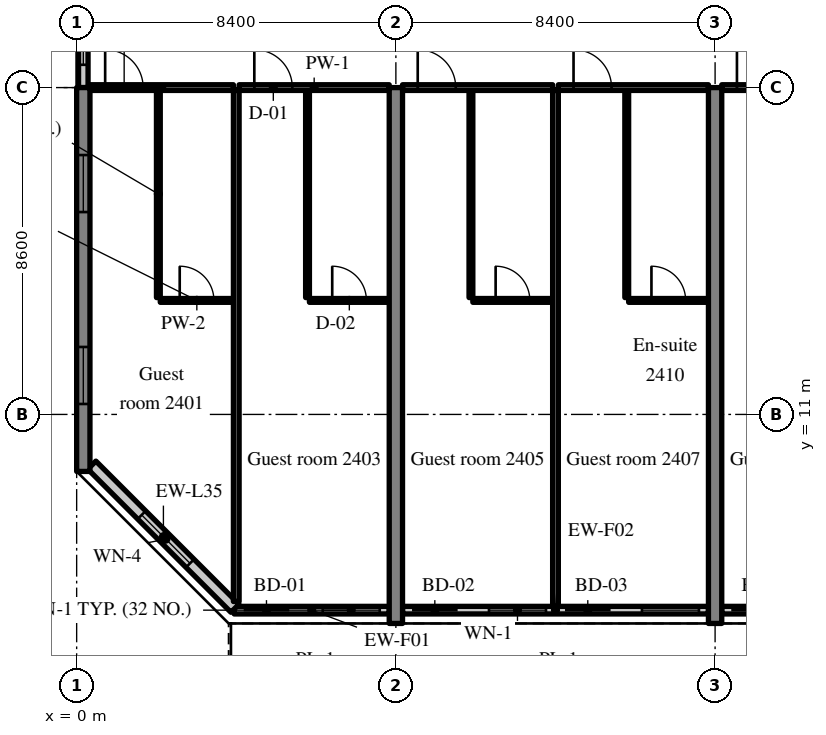
"""IFC4 building model, lengths in metres.
Left out: names, types, materials, properties, quantities, classifications, styles, units other than length and angle.
Written with IfcOpenShell. Run it as: python <this file> out.ifc"""

import sys

from ifc_helpers import new_model, si_unit, direction, frame, frame_2d, origin, place, context, subcontext, project, spatial, rectangle, extrude, source, transform, mapped, element, fill, save


model = new_model("IFC4")
c1 = context("Model", 3, precision=1e-05, world=origin(), true_north=direction((0.0, 1.0)))
c2 = subcontext(c1, "Body", "Model", "MODEL_VIEW")
j1 = project(units=[si_unit("LENGTHUNIT", "METRE"), si_unit("PLANEANGLEUNIT", "RADIAN")], contexts=[c1])
p1 = place(None, origin())
s1 = spatial("IfcSite", under=j1, at=p1, CompositionType="ELEMENT")
p2 = place(p1, origin())
s2 = spatial("IfcBuilding", under=s1, at=p2, CompositionType="ELEMENT")
p3 = place(p2, frame((0.0, 0.0, 102.8)))
s3 = spatial("IfcBuildingStorey", under=s2, at=p3, CompositionType="ELEMENT", Elevation=102.8)
m1 = source(origin(), c2, "Body", "SweptSolid", [
    extrude(rectangle(XDim=10.1, YDim=0.35, at=frame_2d((5.05, 0.0))), origin(), (0.0, 0.0, 1.0), 3.52),
])
p4 = place(p3, frame((0.175, 9.5, 0.0), z_axis=(0.0, 0.0, 1.0), x_axis=(0.0, 1.0, 0.0)))
e1 = element("IfcWall", 1, at=p4, inside=s3, PredefinedType="SHEAR", context=c2, shape_type="MappedRepresentation", body=[
    mapped(m1, transform((0.0, 0.0, 0.0), scale=1.0)),
])
m2 = source(origin(), c2, "Body", "SweptSolid", [
    extrude(rectangle(XDim=1.5, YDim=1.5, at=frame_2d((0.75, 0.75))), frame((0.0, 0.185, 0.0), z_axis=(0.0, -1.0, 0.0), x_axis=(1.0, 0.0, 0.0)), (0.0, 0.0, 1.0), 0.37),
])
p5 = place(p4, frame((1.775, 0.0, 0.9)))
e2 = element("IfcOpeningElement", 2, at=p5, cuts=e1, PredefinedType="OPENING", context=c2, shape_type="MappedRepresentation", body=[
    mapped(m2, transform((0.0, 0.0, 0.0), scale=1.0)),
])
p6 = place(p4, frame((6.825, 0.0, 0.9)))
e3 = element("IfcOpeningElement", 3, at=p6, cuts=e1, PredefinedType="OPENING", context=c2, shape_type="MappedRepresentation", body=[
    mapped(m2, transform((0.0, 0.0, 0.0), scale=1.0)),
])
m3 = source(origin(), c2, "Body", "SweptSolid", [
    extrude(rectangle(XDim=14.1, YDim=0.35, at=frame_2d((7.05, 0.0))), origin(), (0.0, 0.0, 1.0), 3.52),
])
for number, where, z_axis, x_axis in (
    (4, (8.4, 5.5, 0.0), (0.0, 0.0, 1.0), (0.0, 1.0, 0.0)),
    (5, (16.8, 5.5, 0.0), (0.0, 0.0, 1.0), (0.0, 1.0, 0.0)),
):
    element("IfcWall", number, at=place(p3, frame(where, z_axis=z_axis, x_axis=x_axis)), inside=s3, PredefinedType="SHEAR", context=c2, shape_type="MappedRepresentation", body=[
        mapped(m3, transform((0.0, 0.0, 0.0), scale=1.0)),
    ])
m4 = source(origin(), c2, "Body", "SweptSolid", [
    extrude(rectangle(XDim=4.08, YDim=0.2, at=frame_2d((2.04, 0.0))), origin(), (0.0, 0.0, 1.0), 2.82),
])
p7 = place(p3, frame((4.145, 5.85, 0.0), z_axis=(0.0, 0.0, 1.0), x_axis=(1.0, 0.0, 0.0)))
e6 = element("IfcWall", 6, at=p7, inside=s3, PredefinedType="SOLIDWALL", context=c2, shape_type="MappedRepresentation", body=[
    mapped(m4, transform((0.0, 0.0, 0.0), scale=1.0)),
])
m5 = source(origin(), c2, "Body", "SweptSolid", [
    extrude(rectangle(XDim=1.2, YDim=2.4, at=frame_2d((0.6, 1.2))), frame((0.0, 0.11, 0.0), z_axis=(0.0, -1.0, 0.0), x_axis=(1.0, 0.0, 0.0)), (0.0, 0.0, 1.0), 0.22),
])
p8 = place(p7, frame((0.25, 0.0, 0.0)))
e7 = element("IfcOpeningElement", 7, at=p8, cuts=e6, PredefinedType="OPENING", context=c2, shape_type="MappedRepresentation", body=[
    mapped(m5, transform((0.0, 0.0, 0.0), scale=1.0)),
])
m6 = source(origin(), c2, "Body", "SweptSolid", [
    extrude(rectangle(XDim=1.5, YDim=1.5, at=frame_2d((0.75, 0.75))), frame((0.0, 0.11, 0.0), z_axis=(0.0, -1.0, 0.0), x_axis=(1.0, 0.0, 0.0)), (0.0, 0.0, 1.0), 0.22),
])
p9 = place(p7, frame((2.33, 0.0, 0.9)))
e8 = element("IfcOpeningElement", 8, at=p9, cuts=e6, PredefinedType="OPENING", context=c2, shape_type="MappedRepresentation", body=[
    mapped(m6, transform((0.0, 0.0, 0.0), scale=1.0)),
])
m7 = source(origin(), c2, "Body", "SweptSolid", [
    extrude(rectangle(XDim=8.05, YDim=0.2, at=frame_2d((4.025, 0.0))), origin(), (0.0, 0.0, 1.0), 2.82),
])
p10 = place(p3, frame((8.575, 5.85, 0.0), z_axis=(0.0, 0.0, 1.0), x_axis=(1.0, 0.0, 0.0)))
e9 = element("IfcWall", 9, at=p10, inside=s3, PredefinedType="SOLIDWALL", context=c2, shape_type="MappedRepresentation", body=[
    mapped(m7, transform((0.0, 0.0, 0.0), scale=1.0)),
])
p11 = place(p10, frame((0.25, 0.0, 0.0)))
e10 = element("IfcOpeningElement", 10, at=p11, cuts=e9, PredefinedType="OPENING", context=c2, shape_type="MappedRepresentation", body=[
    mapped(m5, transform((0.0, 0.0, 0.0), scale=1.0)),
])
p12 = place(p10, frame((2.275, 0.0, 0.9)))
e11 = element("IfcOpeningElement", 11, at=p12, cuts=e9, PredefinedType="OPENING", context=c2, shape_type="MappedRepresentation", body=[
    mapped(m6, transform((0.0, 0.0, 0.0), scale=1.0)),
])
p13 = place(p10, frame((4.275, 0.0, 0.0)))
e12 = element("IfcOpeningElement", 12, at=p13, cuts=e9, PredefinedType="OPENING", context=c2, shape_type="MappedRepresentation", body=[
    mapped(m5, transform((0.0, 0.0, 0.0), scale=1.0)),
])
p14 = place(p10, frame((6.3, 0.0, 0.9)))
e13 = element("IfcOpeningElement", 13, at=p14, cuts=e9, PredefinedType="OPENING", context=c2, shape_type="MappedRepresentation", body=[
    mapped(m6, transform((0.0, 0.0, 0.0), scale=1.0)),
])
m8 = source(origin(), c2, "Body", "SweptSolid", [
    extrude(rectangle(XDim=8.05, YDim=0.2, at=frame_2d((4.025, 0.0))), origin(), (0.0, 0.0, 1.0), 2.82),
])
p15 = place(p3, frame((16.975, 5.85, 0.0), z_axis=(0.0, 0.0, 1.0), x_axis=(1.0, 0.0, 0.0)))
e14 = element("IfcWall", 14, at=p15, inside=s3, PredefinedType="SOLIDWALL", context=c2, shape_type="MappedRepresentation", body=[
    mapped(m8, transform((0.0, 0.0, 0.0), scale=1.0)),
])
p16 = place(p15, frame((0.25, 0.0, 0.0)))
e15 = element("IfcOpeningElement", 15, at=p16, cuts=e14, PredefinedType="OPENING", context=c2, shape_type="MappedRepresentation", body=[
    mapped(m5, transform((0.0, 0.0, 0.0), scale=1.0)),
])
p17 = place(p15, frame((2.275, 0.0, 0.9)))
e16 = element("IfcOpeningElement", 16, at=p17, cuts=e14, PredefinedType="OPENING", context=c2, shape_type="MappedRepresentation", body=[
    mapped(m6, transform((0.0, 0.0, 0.0), scale=1.0)),
])
p18 = place(p15, frame((4.275, 0.0, 0.0)))
e17 = element("IfcOpeningElement", 17, at=p18, cuts=e14, PredefinedType="OPENING", context=c2, shape_type="MappedRepresentation", body=[
    mapped(m5, transform((0.0, 0.0, 0.0), scale=1.0)),
])
p19 = place(p15, frame((6.3, 0.0, 0.9)))
e18 = element("IfcOpeningElement", 18, at=p19, cuts=e14, PredefinedType="OPENING", context=c2, shape_type="MappedRepresentation", body=[
    mapped(m6, transform((0.0, 0.0, 0.0), scale=1.0)),
])
m9 = source(origin(), c2, "Body", "SweptSolid", [
    extrude(rectangle(XDim=5.326, YDim=0.3, at=frame_2d((2.663, 0.0))), origin(), (0.0, 0.0, 1.0), 3.52),
])
p20 = place(p3, frame((0.4, 9.666, 0.0), z_axis=(0.0, 0.0, 1.0), x_axis=(0.707106781187, -0.707106781187, 0.0)))
e19 = element("IfcWall", 19, at=p20, inside=s3, PredefinedType="SOLIDWALL", context=c2, shape_type="MappedRepresentation", body=[
    mapped(m9, transform((0.0, 0.0, 0.0), scale=1.0)),
])
m10 = source(origin(), c2, "Body", "SweptSolid", [
    extrude(rectangle(XDim=1.8, YDim=1.5, at=frame_2d((0.9, 0.75))), frame((0.0, 0.16, 0.0), z_axis=(0.0, -1.0, 0.0), x_axis=(1.0, 0.0, 0.0)), (0.0, 0.0, 1.0), 0.32),
])
p21 = place(p20, frame((1.854, 0.0, 0.9)))
e20 = element("IfcOpeningElement", 20, at=p21, cuts=e19, PredefinedType="OPENING", context=c2, shape_type="MappedRepresentation", body=[
    mapped(m10, transform((0.0, 0.0, 0.0), scale=1.0)),
])
m11 = source(origin(), c2, "Body", "SweptSolid", [
    extrude(rectangle(XDim=2.4, YDim=0.25, at=frame_2d((1.2, 0.0))), origin(), (0.0, 0.0, 1.0), 2.62),
])
p22 = place(p3, frame((0.175, 19.6, 0.0), z_axis=(0.0, 0.0, 1.0), x_axis=(0.0, 1.0, 0.0)))
e21 = element("IfcWall", 21, at=p22, inside=s3, PredefinedType="SOLIDWALL", context=c2, shape_type="MappedRepresentation", body=[
    mapped(m11, transform((0.0, 0.0, 0.0), scale=1.0)),
])
m12 = source(origin(), c2, "Body", "SweptSolid", [
    extrude(rectangle(XDim=1.2, YDim=1.5, at=frame_2d((0.6, 0.75))), frame((0.0, 0.135, 0.0), z_axis=(0.0, -1.0, 0.0), x_axis=(1.0, 0.0, 0.0)), (0.0, 0.0, 1.0), 0.27),
])
p23 = place(p22, frame((0.6, 0.0, 0.9)))
e22 = element("IfcOpeningElement", 22, at=p23, cuts=e21, PredefinedType="OPENING", context=c2, shape_type="MappedRepresentation", body=[
    mapped(m12, transform((0.0, 0.0, 0.0), scale=1.0)),
])
m13 = source(origin(), c2, "Body", "SweptSolid", [
    extrude(rectangle(XDim=5.45, YDim=0.1, at=frame_2d((2.725, 0.0))), origin(), (0.0, 0.0, 1.0), 3.52),
])
p24 = place(p3, frame((2.15, 14.075, 0.0), z_axis=(0.0, 0.0, 1.0), x_axis=(0.0, 1.0, 0.0)))
e23 = element("IfcWall", 23, at=p24, inside=s3, PredefinedType="PARTITIONING", context=c2, shape_type="MappedRepresentation", body=[
    mapped(m13, transform((0.0, 0.0, 0.0), scale=1.0)),
])
m14 = source(origin(), c2, "Body", "SweptSolid", [
    extrude(rectangle(XDim=1.925, YDim=0.1, at=frame_2d((0.962, 0.0))), origin(), (0.0, 0.0, 1.0), 3.52),
])
p25 = place(p3, frame((2.2, 14.0, 0.0), z_axis=(0.0, 0.0, 1.0), x_axis=(1.0, 0.0, 0.0)))
e24 = element("IfcWall", 24, at=p25, inside=s3, PredefinedType="PARTITIONING", context=c2, shape_type="MappedRepresentation", body=[
    mapped(m14, transform((0.0, 0.0, 0.0), scale=1.0)),
])
m15 = source(origin(), c2, "Body", "SweptSolid", [
    extrude(rectangle(XDim=0.9, YDim=2.1, at=frame_2d((0.45, 1.05))), frame((0.0, 0.06, 0.0), z_axis=(0.0, -1.0, 0.0), x_axis=(1.0, 0.0, 0.0)), (0.0, 0.0, 1.0), 0.12),
])
p26 = place(p25, frame((0.512, 0.0, 0.0)))
e25 = element("IfcOpeningElement", 25, at=p26, cuts=e24, PredefinedType="OPENING", context=c2, shape_type="MappedRepresentation", body=[
    mapped(m15, transform((0.0, 0.0, 0.0), scale=1.0)),
])
m16 = source(origin(), c2, "Body", "SweptSolid", [
    extrude(rectangle(XDim=3.775, YDim=0.15, at=frame_2d((1.887, 0.0))), origin(), (0.0, 0.0, 1.0), 2.82),
])
p27 = place(p3, frame((0.35, 19.6, 0.0), z_axis=(0.0, 0.0, 1.0), x_axis=(1.0, 0.0, 0.0)))
e26 = element("IfcWall", 26, at=p27, inside=s3, PredefinedType="PARTITIONING", context=c2, shape_type="MappedRepresentation", body=[
    mapped(m16, transform((0.0, 0.0, 0.0), scale=1.0)),
])
m17 = source(origin(), c2, "Body", "SweptSolid", [
    extrude(rectangle(XDim=1.0, YDim=2.1, at=frame_2d((0.5, 1.05))), frame((0.0, 0.085, 0.0), z_axis=(0.0, -1.0, 0.0), x_axis=(1.0, 0.0, 0.0)), (0.0, 0.0, 1.0), 0.17),
])
p28 = place(p27, frame((0.4, 0.0, 0.0)))
e27 = element("IfcOpeningElement", 27, at=p28, cuts=e26, PredefinedType="OPENING", context=c2, shape_type="MappedRepresentation", body=[
    mapped(m17, transform((0.0, 0.0, 0.0), scale=1.0)),
])
p29 = place(p3, frame((6.075, 14.075, 0.0), z_axis=(0.0, 0.0, 1.0), x_axis=(0.0, 1.0, 0.0)))
e28 = element("IfcWall", 28, at=p29, inside=s3, PredefinedType="PARTITIONING", context=c2, shape_type="MappedRepresentation", body=[
    mapped(m13, transform((0.0, 0.0, 0.0), scale=1.0)),
])
m18 = source(origin(), c2, "Body", "SweptSolid", [
    extrude(rectangle(XDim=2.1, YDim=0.1, at=frame_2d((1.05, 0.0))), origin(), (0.0, 0.0, 1.0), 3.52),
])
p30 = place(p3, frame((6.125, 14.0, 0.0), z_axis=(0.0, 0.0, 1.0), x_axis=(1.0, 0.0, 0.0)))
e29 = element("IfcWall", 29, at=p30, inside=s3, PredefinedType="PARTITIONING", context=c2, shape_type="MappedRepresentation", body=[
    mapped(m18, transform((0.0, 0.0, 0.0), scale=1.0)),
])
p31 = place(p30, frame((0.6, 0.0, 0.0)))
e30 = element("IfcOpeningElement", 30, at=p31, cuts=e29, PredefinedType="OPENING", context=c2, shape_type="MappedRepresentation", body=[
    mapped(m15, transform((0.0, 0.0, 0.0), scale=1.0)),
])
m19 = source(origin(), c2, "Body", "SweptSolid", [
    extrude(rectangle(XDim=3.95, YDim=0.15, at=frame_2d((1.975, 0.0))), origin(), (0.0, 0.0, 1.0), 2.82),
])
p32 = place(p3, frame((4.275, 19.6, 0.0), z_axis=(0.0, 0.0, 1.0), x_axis=(1.0, 0.0, 0.0)))
e31 = element("IfcWall", 31, at=p32, inside=s3, PredefinedType="PARTITIONING", context=c2, shape_type="MappedRepresentation", body=[
    mapped(m19, transform((0.0, 0.0, 0.0), scale=1.0)),
])
p33 = place(p32, frame((0.4, 0.0, 0.0)))
e32 = element("IfcOpeningElement", 32, at=p33, cuts=e31, PredefinedType="OPENING", context=c2, shape_type="MappedRepresentation", body=[
    mapped(m17, transform((0.0, 0.0, 0.0), scale=1.0)),
])
m20 = source(origin(), c2, "Body", "SweptSolid", [
    extrude(rectangle(XDim=13.447, YDim=0.15, at=frame_2d((6.724, 0.0))), origin(), (0.0, 0.0, 1.0), 3.52),
])
p34 = place(p3, frame((4.2, 6.078, 0.0), z_axis=(0.0, 0.0, 1.0), x_axis=(0.0, 1.0, 0.0)))
e33 = element("IfcWall", 33, at=p34, inside=s3, PredefinedType="PARTITIONING", context=c2, shape_type="MappedRepresentation", body=[
    mapped(m20, transform((0.0, 0.0, 0.0), scale=1.0)),
])
p35 = place(p3, frame((10.375, 14.075, 0.0), z_axis=(0.0, 0.0, 1.0), x_axis=(0.0, 1.0, 0.0)))
e34 = element("IfcWall", 34, at=p35, inside=s3, PredefinedType="PARTITIONING", context=c2, shape_type="MappedRepresentation", body=[
    mapped(m13, transform((0.0, 0.0, 0.0), scale=1.0)),
])
m21 = source(origin(), c2, "Body", "SweptSolid", [
    extrude(rectangle(XDim=2.1, YDim=0.1, at=frame_2d((1.05, 0.0))), origin(), (0.0, 0.0, 1.0), 3.52),
])
p36 = place(p3, frame((10.425, 14.0, 0.0), z_axis=(0.0, 0.0, 1.0), x_axis=(1.0, 0.0, 0.0)))
e35 = element("IfcWall", 35, at=p36, inside=s3, PredefinedType="PARTITIONING", context=c2, shape_type="MappedRepresentation", body=[
    mapped(m21, transform((0.0, 0.0, 0.0), scale=1.0)),
])
p37 = place(p36, frame((0.6, 0.0, 0.0)))
e36 = element("IfcOpeningElement", 36, at=p37, cuts=e35, PredefinedType="OPENING", context=c2, shape_type="MappedRepresentation", body=[
    mapped(m15, transform((0.0, 0.0, 0.0), scale=1.0)),
])
m22 = source(origin(), c2, "Body", "SweptSolid", [
    extrude(rectangle(XDim=3.95, YDim=0.15, at=frame_2d((1.975, 0.0))), origin(), (0.0, 0.0, 1.0), 2.82),
])
p38 = place(p3, frame((8.575, 19.6, 0.0), z_axis=(0.0, 0.0, 1.0), x_axis=(1.0, 0.0, 0.0)))
e37 = element("IfcWall", 37, at=p38, inside=s3, PredefinedType="PARTITIONING", context=c2, shape_type="MappedRepresentation", body=[
    mapped(m22, transform((0.0, 0.0, 0.0), scale=1.0)),
])
p39 = place(p38, frame((0.4, 0.0, 0.0)))
e38 = element("IfcOpeningElement", 38, at=p39, cuts=e37, PredefinedType="OPENING", context=c2, shape_type="MappedRepresentation", body=[
    mapped(m17, transform((0.0, 0.0, 0.0), scale=1.0)),
])
p40 = place(p3, frame((14.475, 14.075, 0.0), z_axis=(0.0, 0.0, 1.0), x_axis=(0.0, 1.0, 0.0)))
e39 = element("IfcWall", 39, at=p40, inside=s3, PredefinedType="PARTITIONING", context=c2, shape_type="MappedRepresentation", body=[
    mapped(m13, transform((0.0, 0.0, 0.0), scale=1.0)),
])
p41 = place(p3, frame((14.525, 14.0, 0.0), z_axis=(0.0, 0.0, 1.0), x_axis=(1.0, 0.0, 0.0)))
e40 = element("IfcWall", 40, at=p41, inside=s3, PredefinedType="PARTITIONING", context=c2, shape_type="MappedRepresentation", body=[
    mapped(m18, transform((0.0, 0.0, 0.0), scale=1.0)),
])
p42 = place(p41, frame((0.6, 0.0, 0.0)))
e41 = element("IfcOpeningElement", 41, at=p42, cuts=e40, PredefinedType="OPENING", context=c2, shape_type="MappedRepresentation", body=[
    mapped(m15, transform((0.0, 0.0, 0.0), scale=1.0)),
])
p43 = place(p3, frame((12.675, 19.6, 0.0), z_axis=(0.0, 0.0, 1.0), x_axis=(1.0, 0.0, 0.0)))
e42 = element("IfcWall", 42, at=p43, inside=s3, PredefinedType="PARTITIONING", context=c2, shape_type="MappedRepresentation", body=[
    mapped(m22, transform((0.0, 0.0, 0.0), scale=1.0)),
])
p44 = place(p43, frame((0.4, 0.0, 0.0)))
e43 = element("IfcOpeningElement", 43, at=p44, cuts=e42, PredefinedType="OPENING", context=c2, shape_type="MappedRepresentation", body=[
    mapped(m17, transform((0.0, 0.0, 0.0), scale=1.0)),
])
m23 = source(origin(), c2, "Body", "SweptSolid", [
    extrude(rectangle(XDim=13.575, YDim=0.15, at=frame_2d((6.788, 0.0))), origin(), (0.0, 0.0, 1.0), 3.52),
])
p45 = place(p3, frame((12.6, 5.95, 0.0), z_axis=(0.0, 0.0, 1.0), x_axis=(0.0, 1.0, 0.0)))
e44 = element("IfcWall", 44, at=p45, inside=s3, PredefinedType="PARTITIONING", context=c2, shape_type="MappedRepresentation", body=[
    mapped(m23, transform((0.0, 0.0, 0.0), scale=1.0)),
])
p46 = place(p3, frame((16.975, 19.6, 0.0), z_axis=(0.0, 0.0, 1.0), x_axis=(1.0, 0.0, 0.0)))
e45 = element("IfcWall", 45, at=p46, inside=s3, PredefinedType="PARTITIONING", context=c2, shape_type="MappedRepresentation", body=[
    mapped(m22, transform((0.0, 0.0, 0.0), scale=1.0)),
])
p47 = place(p46, frame((0.4, 0.0, 0.0)))
e46 = element("IfcOpeningElement", 46, at=p47, cuts=e45, PredefinedType="OPENING", context=c2, shape_type="MappedRepresentation", body=[
    mapped(m17, transform((0.0, 0.0, 0.0), scale=1.0)),
])
m24 = source(origin(), c2, "Body", "SweptSolid", [
    extrude(rectangle(XDim=1.2, YDim=2.4, at=frame_2d((0.6, 1.2))), frame((0.0, 0.025, 0.0), z_axis=(0.0, -1.0, 0.0), x_axis=(1.0, 0.0, 0.0)), (0.0, 0.0, 1.0), 0.05),
])
p48 = place(p8, origin())
e47 = element("IfcDoor", 47, at=p48, inside=s3, OperationType="SLIDING_TO_LEFT", PredefinedType="DOOR", context=c2, shape_type="MappedRepresentation", body=[
    mapped(m24, transform((0.0, 0.0, 0.0), scale=1.0)),
])
fill(e7, e47)
m25 = source(origin(), c2, "Body", "SweptSolid", [
    extrude(rectangle(XDim=1.5, YDim=1.5, at=frame_2d((0.75, 0.75))), frame((0.0, 0.03, 0.0), z_axis=(0.0, -1.0, 0.0), x_axis=(1.0, 0.0, 0.0)), (0.0, 0.0, 1.0), 0.06),
])
p49 = place(p9, origin())
e48 = element("IfcWindow", 48, at=p49, inside=s3, PartitioningType="SINGLE_PANEL", PredefinedType="WINDOW", context=c2, shape_type="MappedRepresentation", body=[
    mapped(m25, transform((0.0, 0.0, 0.0), scale=1.0)),
])
fill(e8, e48)
p50 = place(p11, origin())
e49 = element("IfcDoor", 49, at=p50, inside=s3, OperationType="SLIDING_TO_RIGHT", PredefinedType="DOOR", context=c2, shape_type="MappedRepresentation", body=[
    mapped(m24, transform((0.0, 0.0, 0.0), scale=1.0)),
])
fill(e10, e49)
p51 = place(p12, origin())
e50 = element("IfcWindow", 50, at=p51, inside=s3, PartitioningType="SINGLE_PANEL", PredefinedType="WINDOW", context=c2, shape_type="MappedRepresentation", body=[
    mapped(m25, transform((0.0, 0.0, 0.0), scale=1.0)),
])
fill(e11, e50)
p52 = place(p13, origin())
e51 = element("IfcDoor", 51, at=p52, inside=s3, OperationType="SLIDING_TO_LEFT", PredefinedType="DOOR", context=c2, shape_type="MappedRepresentation", body=[
    mapped(m24, transform((0.0, 0.0, 0.0), scale=1.0)),
])
fill(e12, e51)
p53 = place(p14, origin())
e52 = element("IfcWindow", 52, at=p53, inside=s3, PartitioningType="SINGLE_PANEL", PredefinedType="WINDOW", context=c2, shape_type="MappedRepresentation", body=[
    mapped(m25, transform((0.0, 0.0, 0.0), scale=1.0)),
])
fill(e13, e52)
p54 = place(p16, origin())
e53 = element("IfcDoor", 53, at=p54, inside=s3, OperationType="SLIDING_TO_RIGHT", PredefinedType="DOOR", context=c2, shape_type="MappedRepresentation", body=[
    mapped(m24, transform((0.0, 0.0, 0.0), scale=1.0)),
])
fill(e15, e53)
m26 = source(origin(), c2, "Body", "SweptSolid", [
    extrude(rectangle(XDim=1.8, YDim=1.5, at=frame_2d((0.9, 0.75))), frame((0.0, 0.03, 0.0), z_axis=(0.0, -1.0, 0.0), x_axis=(1.0, 0.0, 0.0)), (0.0, 0.0, 1.0), 0.06),
])
p55 = place(p21, origin())
e54 = element("IfcWindow", 54, at=p55, inside=s3, PartitioningType="SINGLE_PANEL", PredefinedType="WINDOW", context=c2, shape_type="MappedRepresentation", body=[
    mapped(m26, transform((0.0, 0.0, 0.0), scale=1.0)),
])
fill(e20, e54)
p56 = place(p5, origin())
e55 = element("IfcWindow", 55, at=p56, inside=s3, PartitioningType="SINGLE_PANEL", PredefinedType="WINDOW", context=c2, shape_type="MappedRepresentation", body=[
    mapped(m25, transform((0.0, 0.0, 0.0), scale=1.0)),
])
fill(e2, e55)
p57 = place(p6, origin())
e56 = element("IfcWindow", 56, at=p57, inside=s3, PartitioningType="SINGLE_PANEL", PredefinedType="WINDOW", context=c2, shape_type="MappedRepresentation", body=[
    mapped(m25, transform((0.0, 0.0, 0.0), scale=1.0)),
])
fill(e3, e56)
m27 = source(origin(), c2, "Body", "SweptSolid", [
    extrude(rectangle(XDim=1.2, YDim=1.5, at=frame_2d((0.6, 0.75))), frame((0.0, 0.03, 0.0), z_axis=(0.0, -1.0, 0.0), x_axis=(1.0, 0.0, 0.0)), (0.0, 0.0, 1.0), 0.06),
])
p58 = place(p23, origin())
e57 = element("IfcWindow", 57, at=p58, inside=s3, PartitioningType="SINGLE_PANEL", PredefinedType="WINDOW", context=c2, shape_type="MappedRepresentation", body=[
    mapped(m27, transform((0.0, 0.0, 0.0), scale=1.0)),
])
fill(e22, e57)
m28 = source(origin(), c2, "Body", "SweptSolid", [
    extrude(rectangle(XDim=0.9, YDim=2.1, at=frame_2d((0.45, 1.05))), frame((0.0, 0.025, 0.0), z_axis=(0.0, -1.0, 0.0), x_axis=(1.0, 0.0, 0.0)), (0.0, 0.0, 1.0), 0.05),
])
p59 = place(p26, origin())
e58 = element("IfcDoor", 58, at=p59, inside=s3, OperationType="SINGLE_SWING_LEFT", PredefinedType="DOOR", context=c2, shape_type="MappedRepresentation", body=[
    mapped(m28, transform((0.0, 0.0, 0.0), scale=1.0)),
])
fill(e25, e58)
m29 = source(origin(), c2, "Body", "SweptSolid", [
    extrude(rectangle(XDim=1.0, YDim=2.1, at=frame_2d((0.5, 1.05))), frame((0.0, 0.025, 0.0), z_axis=(0.0, -1.0, 0.0), x_axis=(1.0, 0.0, 0.0)), (0.0, 0.0, 1.0), 0.05),
])
p60 = place(p28, origin())
e59 = element("IfcDoor", 59, at=p60, inside=s3, OperationType="SINGLE_SWING_LEFT", PredefinedType="DOOR", context=c2, shape_type="MappedRepresentation", body=[
    mapped(m29, transform((0.0, 0.0, 0.0), scale=1.0)),
])
fill(e27, e59)
p61 = place(p31, origin())
e60 = element("IfcDoor", 60, at=p61, inside=s3, OperationType="SINGLE_SWING_LEFT", PredefinedType="DOOR", context=c2, shape_type="MappedRepresentation", body=[
    mapped(m28, transform((0.0, 0.0, 0.0), scale=1.0)),
])
fill(e30, e60)
p62 = place(p33, origin())
e61 = element("IfcDoor", 61, at=p62, inside=s3, OperationType="SINGLE_SWING_LEFT", PredefinedType="DOOR", context=c2, shape_type="MappedRepresentation", body=[
    mapped(m29, transform((0.0, 0.0, 0.0), scale=1.0)),
])
fill(e32, e61)
p63 = place(p37, origin())
e62 = element("IfcDoor", 62, at=p63, inside=s3, OperationType="SINGLE_SWING_LEFT", PredefinedType="DOOR", context=c2, shape_type="MappedRepresentation", body=[
    mapped(m28, transform((0.0, 0.0, 0.0), scale=1.0)),
])
fill(e36, e62)
p64 = place(p39, origin())
e63 = element("IfcDoor", 63, at=p64, inside=s3, OperationType="SINGLE_SWING_LEFT", PredefinedType="DOOR", context=c2, shape_type="MappedRepresentation", body=[
    mapped(m29, transform((0.0, 0.0, 0.0), scale=1.0)),
])
fill(e38, e63)
p65 = place(p42, origin())
e64 = element("IfcDoor", 64, at=p65, inside=s3, OperationType="SINGLE_SWING_LEFT", PredefinedType="DOOR", context=c2, shape_type="MappedRepresentation", body=[
    mapped(m28, transform((0.0, 0.0, 0.0), scale=1.0)),
])
fill(e41, e64)
p66 = place(p44, origin())
e65 = element("IfcDoor", 65, at=p66, inside=s3, OperationType="SINGLE_SWING_LEFT", PredefinedType="DOOR", context=c2, shape_type="MappedRepresentation", body=[
    mapped(m29, transform((0.0, 0.0, 0.0), scale=1.0)),
])
fill(e43, e65)
p67 = place(p47, origin())
e66 = element("IfcDoor", 66, at=p67, inside=s3, OperationType="SINGLE_SWING_LEFT", PredefinedType="DOOR", context=c2, shape_type="MappedRepresentation", body=[
    mapped(m29, transform((0.0, 0.0, 0.0), scale=1.0)),
])
fill(e46, e66)
save(model, sys.argv[1])
